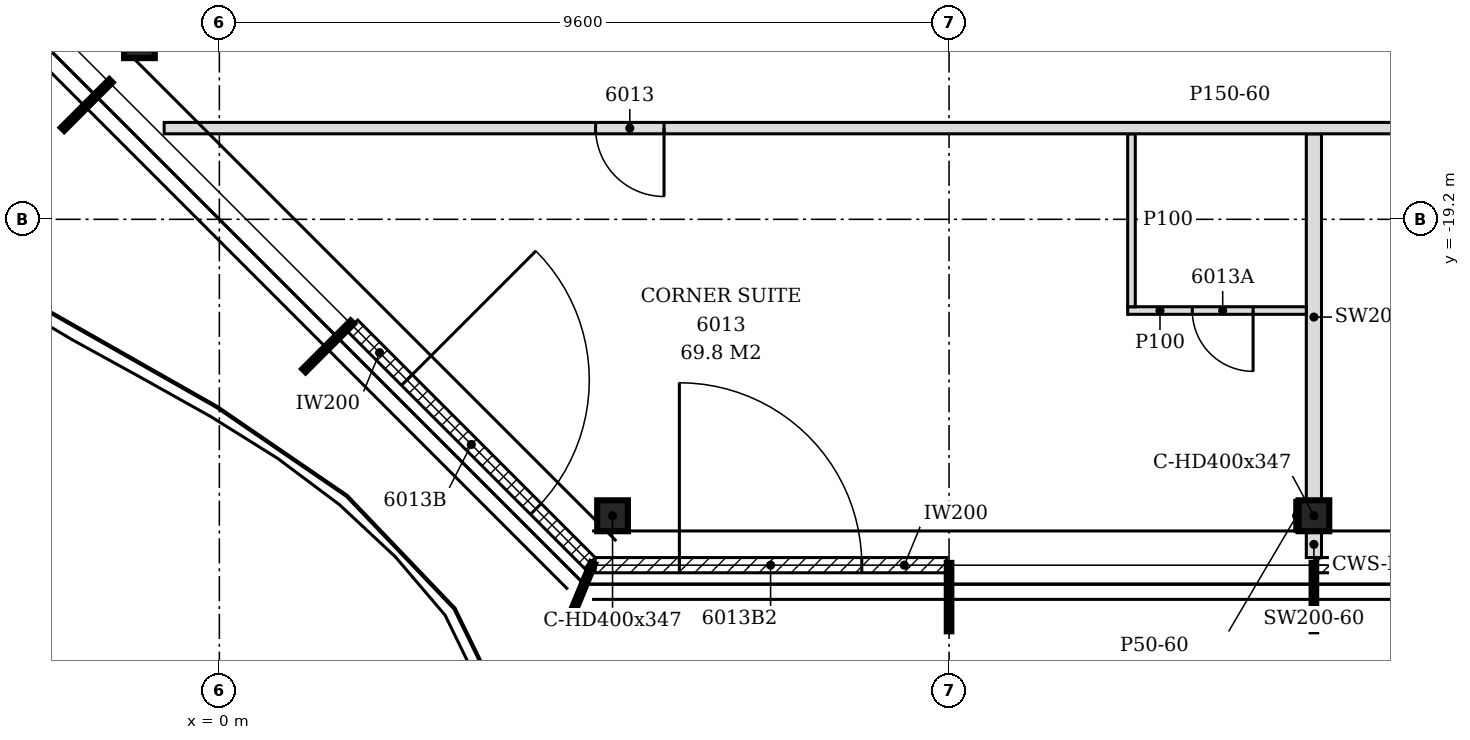
"""IFC4 building model, lengths in metres.
Left out: names, types, materials, properties, quantities, classifications, styles, units other than length and angle.
Written with IfcOpenShell. Run it as: python <this file> out.ifc"""

import sys

from ifc_helpers import new_model, si_unit, direction, frame, frame_2d, origin, origin_2d, place, context, subcontext, project, spatial, polyline, rectangle, i_section, outline, extrude, element, fill, save


model = new_model("IFC4")
c1 = context("Model", 3, precision=1e-05, world=origin(), true_north=direction((0.0, 1.0)))
c2 = subcontext(c1, "Body", "Model", "MODEL_VIEW")
j1 = project(units=[si_unit("LENGTHUNIT", "METRE"), si_unit("PLANEANGLEUNIT", "RADIAN")], contexts=[c1])
p1 = place(None, origin())
s1 = spatial("IfcSite", under=j1, at=p1, CompositionType="ELEMENT")
p2 = place(p1, origin())
s2 = spatial("IfcBuilding", under=s1, at=p2, CompositionType="ELEMENT")
p3 = place(p2, frame((0.0, 0.0, 235.8)))
s3 = spatial("IfcBuildingStorey", under=s2, at=p3, CompositionType="ELEMENT", Elevation=235.8)
for number, where, z_axis, x_axis in (
    (1, (5.173, -23.1, -0.15), (0.0, 0.0, 1.0), (1.0, 0.0, 0.0)),
    (2, (14.4, -23.1, -0.15), (0.0, 0.0, 1.0), (1.0, 0.0, 0.0)),
    (3, (-1.052, -16.876, -0.15), (0.0, 0.0, 1.0), (1.0, 0.0, 0.0)),
):
    element("IfcColumn", number, at=place(p3, frame(where, z_axis=z_axis, x_axis=x_axis)), inside=s3, PredefinedType="COLUMN", context=c2, shape_type="SweptSolid", body=[
        extrude(i_section(OverallWidth=0.404, OverallDepth=0.407, WebThickness=0.027, FlangeThickness=0.044, FilletRadius=0.015, at=origin_2d()), origin(), (0.0, 0.0, 1.0), 3.6),
    ])
p4 = place(p3, frame((4.944, -23.75, 0.0), z_axis=(0.0, 0.0, 1.0), x_axis=(1.0, 0.0, 0.0)))
e4 = element("IfcWall", 4, at=p4, inside=s3, PredefinedType="NOTDEFINED", context=c2, shape_type="SweptSolid", body=[
    extrude(rectangle(XDim=4.626, YDim=0.2, at=frame_2d((2.313, 0.0))), origin(), (0.0, 0.0, 1.0), 3.45),
])
p5 = place(p4, frame((1.108, 0.0, 0.0)))
e5 = element("IfcOpeningElement", 5, at=p5, cuts=e4, PredefinedType="OPENING", context=c2, shape_type="SweptSolid", body=[
    extrude(rectangle(XDim=2.4, YDim=2.4, at=frame_2d((1.2, 1.2))), frame((0.0, 0.11, 0.0), z_axis=(0.0, -1.0, 0.0), x_axis=(1.0, 0.0, 0.0)), (0.0, 0.0, 1.0), 0.22),
])
p6 = place(p3, frame((14.43, -23.75, 0.0), z_axis=(0.0, 0.0, 1.0), x_axis=(1.0, 0.0, 0.0)))
e6 = element("IfcWall", 6, at=p6, inside=s3, PredefinedType="NOTDEFINED", context=c2, shape_type="SweptSolid", body=[
    extrude(rectangle(XDim=4.74, YDim=0.2, at=frame_2d((2.37, 0.0))), origin(), (0.0, 0.0, 1.0), 3.45),
])
p7 = place(p6, frame((1.17, 0.0, 0.0)))
e7 = element("IfcOpeningElement", 7, at=p7, cuts=e6, PredefinedType="OPENING", context=c2, shape_type="SweptSolid", body=[
    extrude(rectangle(XDim=2.4, YDim=2.4, at=frame_2d((1.2, 1.2))), frame((0.0, 0.11, 0.0), z_axis=(0.0, -1.0, 0.0), x_axis=(1.0, 0.0, 0.0)), (0.0, 0.0, 1.0), 0.22),
])
p8 = place(p3, frame((1.749, -20.596, 0.0), z_axis=(0.0, 0.0, 1.0), x_axis=(0.707106781187, -0.707106781187, 0.0)))
e8 = element("IfcWall", 8, at=p8, inside=s3, PredefinedType="NOTDEFINED", context=c2, shape_type="SweptSolid", body=[
    extrude(rectangle(XDim=4.421, YDim=0.2, at=frame_2d((2.21, 0.0))), origin(), (0.0, 0.0, 1.0), 3.45),
])
p9 = place(p8, frame((1.015, 0.0, 0.0)))
e9 = element("IfcOpeningElement", 9, at=p9, cuts=e8, PredefinedType="OPENING", context=c2, shape_type="SweptSolid", body=[
    extrude(rectangle(XDim=2.4, YDim=2.4, at=frame_2d((1.2, 1.2))), frame((0.0, 0.11, 0.0), z_axis=(0.0, -1.0, 0.0), x_axis=(1.0, 0.0, 0.0)), (0.0, 0.0, 1.0), 0.22),
])
p10 = place(p3, frame((14.4, -23.65, 0.0), z_axis=(0.0, 0.0, 1.0), x_axis=(0.0, 1.0, 0.0)))
e10 = element("IfcWall", 10, at=p10, inside=s3, PredefinedType="PARTITIONING", context=c2, shape_type="SweptSolid", body=[
    extrude(rectangle(XDim=0.346, YDim=0.2, at=frame_2d((0.173, 0.0))), origin(), (0.0, 0.0, 1.0), 3.45),
])
p11 = place(p3, frame((14.4, -22.896, 0.0), z_axis=(0.0, 0.0, 1.0), x_axis=(0.0, 1.0, 0.0)))
e11 = element("IfcWall", 11, at=p11, inside=s3, PredefinedType="PARTITIONING", context=c2, shape_type="SweptSolid", body=[
    extrude(outline(polyline([(0.0, 0.0), (4.822, 0.0), (4.822, 3.45), (3.802, 3.45), (3.8, 2.88), (3.592, 2.88), (3.59, 3.45), (0.0, 3.45), (0.0, 0.0)])), frame((0.0, 0.1, 0.0), z_axis=(0.0, -1.0, 0.0), x_axis=(1.0, 0.0, 0.0)), (0.0, 0.0, 1.0), 0.2),
])
p12 = place(p3, frame((11.95, -20.4, 0.0), z_axis=(0.0, 0.0, 1.0), x_axis=(1.0, 0.0, 0.0)))
e12 = element("IfcWall", 12, at=p12, inside=s3, PredefinedType="PARTITIONING", context=c2, shape_type="SweptSolid", body=[
    extrude(rectangle(XDim=2.35, YDim=0.1, at=frame_2d((1.175, 0.0))), origin(), (0.0, 0.0, 1.0), 3.45),
])
p13 = place(p12, frame((0.85, 0.0, 0.0)))
e13 = element("IfcOpeningElement", 13, at=p13, cuts=e12, PredefinedType="OPENING", context=c2, shape_type="SweptSolid", body=[
    extrude(rectangle(XDim=0.8, YDim=2.1, at=frame_2d((0.4, 1.05))), frame((0.0, 0.06, 0.0), z_axis=(0.0, -1.0, 0.0), x_axis=(1.0, 0.0, 0.0)), (0.0, 0.0, 1.0), 0.12),
])
p14 = place(p3, frame((12.0, -20.35, 0.0), z_axis=(0.0, 0.0, 1.0), x_axis=(0.0, 1.0, 0.0)))
e14 = element("IfcWall", 14, at=p14, inside=s3, PredefinedType="PARTITIONING", context=c2, shape_type="SweptSolid", body=[
    extrude(outline(polyline([(0.0, 0.0), (2.275, 0.0), (2.275, 3.45), (1.255, 3.45), (1.253, 2.88), (1.045, 2.88), (1.043, 3.45), (0.0, 3.45), (0.0, 0.0)])), frame((0.0, 0.05, 0.0), z_axis=(0.0, -1.0, 0.0), x_axis=(1.0, 0.0, 0.0)), (0.0, 0.0, 1.0), 0.1),
])
p15 = place(p3, frame((-0.726, -18.0, 0.0), z_axis=(0.0, 0.0, 1.0), x_axis=(1.0, 0.0, 0.0)))
e15 = element("IfcWall", 15, at=p15, inside=s3, PredefinedType="PARTITIONING", context=c2, shape_type="SweptSolid", body=[
    extrude(outline(polyline([(0.0, 0.0), (22.347, 0.0), (22.347, 3.45), (20.076, 3.45), (20.074, 2.73), (19.776, 2.73), (19.774, 3.45), (8.076, 3.45), (8.074, 2.73), (7.776, 2.73), (7.774, 3.45), (1.086, 3.45), (1.084, 2.93), (0.512, 2.93), (0.51, 3.45), (0.0, 3.45), (0.0, 0.0)])), frame((0.0, 0.075, 0.0), z_axis=(0.0, -1.0, 0.0), x_axis=(1.0, 0.0, 0.0)), (0.0, 0.0, 1.0), 0.15),
])
p16 = place(p15, frame((5.676, 0.0, 0.0)))
e16 = element("IfcOpeningElement", 16, at=p16, cuts=e15, PredefinedType="OPENING", context=c2, shape_type="SweptSolid", body=[
    extrude(rectangle(XDim=0.9, YDim=2.1, at=frame_2d((0.45, 1.05))), frame((0.0, 0.085, 0.0), z_axis=(0.0, -1.0, 0.0), x_axis=(1.0, 0.0, 0.0)), (0.0, 0.0, 1.0), 0.17),
])
p17 = place(p3, frame((14.173, -23.303, 0.0), z_axis=(0.0, 0.0, 1.0), x_axis=(0.0, 1.0, 0.0)))
e17 = element("IfcWall", 17, at=p17, inside=s3, PredefinedType="PARTITIONING", context=c2, shape_type="SweptSolid", body=[
    extrude(rectangle(XDim=0.407, YDim=0.05, at=frame_2d((0.204, 0.0))), origin(), (0.0, 0.0, 1.0), 2.93),
])
p18 = place(p5, origin())
e18 = element("IfcDoor", 18, at=p18, inside=s3, OperationType="SINGLE_SWING_LEFT", PredefinedType="DOOR", context=c2, shape_type="SweptSolid", body=[
    extrude(rectangle(XDim=2.4, YDim=2.4, at=frame_2d((1.2, 1.2))), frame((0.0, 0.025, 0.0), z_axis=(0.0, -1.0, 0.0), x_axis=(1.0, 0.0, 0.0)), (0.0, 0.0, 1.0), 0.05),
])
fill(e5, e18)
p19 = place(p9, origin())
e19 = element("IfcDoor", 19, at=p19, inside=s3, OperationType="SINGLE_SWING_LEFT", PredefinedType="DOOR", context=c2, shape_type="SweptSolid", body=[
    extrude(rectangle(XDim=2.4, YDim=2.4, at=frame_2d((1.2, 1.2))), frame((0.0, 0.025, 0.0), z_axis=(0.0, -1.0, 0.0), x_axis=(1.0, 0.0, 0.0)), (0.0, 0.0, 1.0), 0.05),
])
fill(e9, e19)
p20 = place(p16, frame((0.9, 0.0, 0.0), z_axis=(0.0, 0.0, 1.0), x_axis=(-1.0, 0.0, 0.0)))
e20 = element("IfcDoor", 20, at=p20, inside=s3, OperationType="SINGLE_SWING_LEFT", PredefinedType="DOOR", context=c2, shape_type="SweptSolid", body=[
    extrude(rectangle(XDim=0.9, YDim=2.1, at=frame_2d((0.45, 1.05))), frame((0.0, 0.025, 0.0), z_axis=(0.0, -1.0, 0.0), x_axis=(1.0, 0.0, 0.0)), (0.0, 0.0, 1.0), 0.05),
])
fill(e16, e20)
p21 = place(p13, frame((0.8, 0.0, 0.0), z_axis=(0.0, 0.0, 1.0), x_axis=(-1.0, 0.0, 0.0)))
e21 = element("IfcDoor", 21, at=p21, inside=s3, OperationType="SINGLE_SWING_LEFT", PredefinedType="DOOR", context=c2, shape_type="SweptSolid", body=[
    extrude(rectangle(XDim=0.8, YDim=2.1, at=frame_2d((0.4, 1.05))), frame((0.0, 0.025, 0.0), z_axis=(0.0, -1.0, 0.0), x_axis=(1.0, 0.0, 0.0)), (0.0, 0.0, 1.0), 0.05),
])
fill(e13, e21)
save(model, sys.argv[1])
